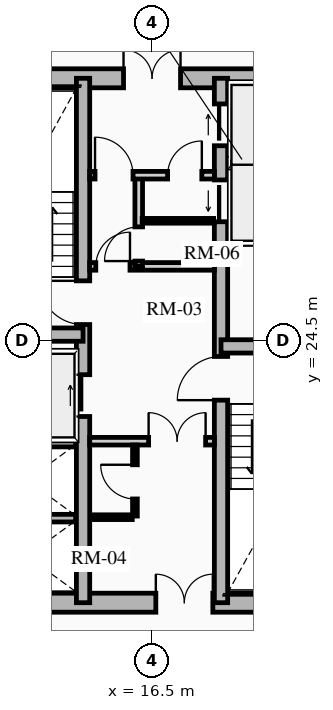
"""IFC4 building model, lengths in metres.
Left out: names, types, materials, properties, quantities, classifications, styles, units other than length and angle.
Written with IfcOpenShell. Run it as: python <this file> out.ifc"""

import sys

from ifc_helpers import new_model, si_unit, direction, frame, frame_2d, origin, place, context, subcontext, project, spatial, rectangle, extrude, source, transform, mapped, element, fill, save


model = new_model("IFC4")
c1 = context("Model", 3, precision=1e-05, world=origin(), true_north=direction((0.0, 1.0)))
c2 = subcontext(c1, "Body", "Model", "MODEL_VIEW")
j1 = project(units=[si_unit("LENGTHUNIT", "METRE"), si_unit("PLANEANGLEUNIT", "RADIAN")], contexts=[c1])
p1 = place(None, origin())
s1 = spatial("IfcSite", under=j1, at=p1, CompositionType="ELEMENT")
p2 = place(p1, origin())
s2 = spatial("IfcBuilding", under=s1, at=p2, CompositionType="ELEMENT")
p3 = place(p2, frame((0.0, 0.0, 51.1)))
s3 = spatial("IfcBuildingStorey", under=s2, at=p3, CompositionType="ELEMENT", Elevation=51.1)
p4 = place(p3, frame((11.15, 17.6, 0.0), z_axis=(0.0, 0.0, 1.0), x_axis=(1.0, 0.0, 0.0)))
e1 = element("IfcWall", 1, at=p4, inside=s3, PredefinedType="SHEAR", context=c2, shape_type="SweptSolid", body=[
    extrude(rectangle(XDim=10.7, YDim=0.5, at=frame_2d((5.35, 0.0))), origin(), (0.0, 0.0, 1.0), 2.91),
])
m1 = source(origin(), c2, "Body", "SweptSolid", [
    extrude(rectangle(XDim=1.5, YDim=2.02, at=frame_2d((0.75, 1.01))), frame((0.0, 0.26, 0.0), z_axis=(0.0, -1.0, 0.0), x_axis=(1.0, 0.0, 0.0)), (0.0, 0.0, 1.0), 0.52),
])
p5 = place(p4, frame((5.45, 0.0, 0.0)))
e2 = element("IfcOpeningElement", 2, at=p5, cuts=e1, PredefinedType="OPENING", context=c2, shape_type="MappedRepresentation", body=[
    mapped(m1, transform((0.0, 0.0, 0.0), x_axis=(1.0, 0.0, 0.0), y_axis=(0.0, 1.0, 0.0), z_axis=(0.0, 0.0, 1.0), scale=1.0)),
])
p6 = place(p3, frame((11.15, 31.4, 0.0), z_axis=(0.0, 0.0, 1.0), x_axis=(1.0, 0.0, 0.0)))
e3 = element("IfcWall", 3, at=p6, inside=s3, PredefinedType="SHEAR", context=c2, shape_type="SweptSolid", body=[
    extrude(rectangle(XDim=10.7, YDim=0.5, at=frame_2d((5.35, 0.0))), origin(), (0.0, 0.0, 1.0), 2.91),
])
p7 = place(p6, frame((4.6, 0.0, 0.0)))
e4 = element("IfcOpeningElement", 4, at=p7, cuts=e3, PredefinedType="OPENING", context=c2, shape_type="MappedRepresentation", body=[
    mapped(m1, transform((0.0, 0.0, 0.0), x_axis=(1.0, 0.0, 0.0), y_axis=(0.0, 1.0, 0.0), z_axis=(0.0, 0.0, 1.0), scale=1.0)),
])
p8 = place(p3, frame((14.685, 17.6, 0.0), z_axis=(0.0, 0.0, 1.0), x_axis=(0.0, 1.0, 0.0)))
e5 = element("IfcWall", 5, at=p8, inside=s3, PredefinedType="SHEAR", context=c2, shape_type="SweptSolid", body=[
    extrude(rectangle(XDim=13.8, YDim=0.35, at=frame_2d((6.9, 0.0))), origin(), (0.0, 0.0, 1.0), 2.91),
])
m2 = source(origin(), c2, "Body", "SweptSolid", [
    extrude(rectangle(XDim=1.1, YDim=2.015, at=frame_2d((0.55, 1.007))), frame((0.0, 0.185, 0.0), z_axis=(0.0, -1.0, 0.0), x_axis=(1.0, 0.0, 0.0)), (0.0, 0.0, 1.0), 0.37),
])
p9 = place(p8, frame((4.9, 0.0, 0.0)))
e6 = element("IfcOpeningElement", 6, at=p9, cuts=e5, PredefinedType="OPENING", context=c2, shape_type="MappedRepresentation", body=[
    mapped(m2, transform((0.0, 0.0, 0.0), x_axis=(1.0, 0.0, 0.0), y_axis=(0.0, 1.0, 0.0), z_axis=(0.0, 0.0, 1.0), scale=1.0)),
])
m3 = source(origin(), c2, "Body", "SweptSolid", [
    extrude(rectangle(XDim=1.15, YDim=2.02, at=frame_2d((0.575, 1.01))), frame((0.0, 0.185, 0.0), z_axis=(0.0, -1.0, 0.0), x_axis=(1.0, 0.0, 0.0)), (0.0, 0.0, 1.0), 0.37),
])
p10 = place(p8, frame((7.32, 0.0, 0.0)))
e7 = element("IfcOpeningElement", 7, at=p10, cuts=e5, PredefinedType="OPENING", context=c2, shape_type="MappedRepresentation", body=[
    mapped(m3, transform((0.0, 0.0, 0.0), x_axis=(1.0, 0.0, 0.0), y_axis=(0.0, 1.0, 0.0), z_axis=(0.0, 0.0, 1.0), scale=1.0)),
])
p11 = place(p3, frame((18.315, 17.6, 0.0), z_axis=(0.0, 0.0, 1.0), x_axis=(0.0, 1.0, 0.0)))
e8 = element("IfcWall", 8, at=p11, inside=s3, PredefinedType="SHEAR", context=c2, shape_type="SweptSolid", body=[
    extrude(rectangle(XDim=13.8, YDim=0.35, at=frame_2d((6.9, 0.0))), origin(), (0.0, 0.0, 1.0), 2.91),
])
p12 = place(p11, frame((10.025, 0.0, 0.0)))
e9 = element("IfcOpeningElement", 9, at=p12, cuts=e8, PredefinedType="OPENING", context=c2, shape_type="MappedRepresentation", body=[
    mapped(m2, transform((0.0, 0.0, 0.0), x_axis=(1.0, 0.0, 0.0), y_axis=(0.0, 1.0, 0.0), z_axis=(0.0, 0.0, 1.0), scale=1.0)),
])
p13 = place(p11, frame((12.025, 0.0, 0.0)))
e10 = element("IfcOpeningElement", 10, at=p13, cuts=e8, PredefinedType="OPENING", context=c2, shape_type="MappedRepresentation", body=[
    mapped(m2, transform((0.0, 0.0, 0.0), x_axis=(1.0, 0.0, 0.0), y_axis=(0.0, 1.0, 0.0), z_axis=(0.0, 0.0, 1.0), scale=1.0)),
])
p14 = place(p11, frame((5.33, 0.0, 0.0)))
e11 = element("IfcOpeningElement", 11, at=p14, cuts=e8, PredefinedType="OPENING", context=c2, shape_type="MappedRepresentation", body=[
    mapped(m3, transform((0.0, 0.0, 0.0), x_axis=(1.0, 0.0, 0.0), y_axis=(0.0, 1.0, 0.0), z_axis=(0.0, 0.0, 1.0), scale=1.0)),
])
for number, where, z_axis, x_axis in (
    (12, (11.4, 24.655, 0.0), (0.0, 0.0, 1.0), (1.0, 0.0, 0.0)),
    (13, (18.315, 24.345, 0.0), (0.0, 0.0, 1.0), (1.0, 0.0, 0.0)),
):
    element("IfcWall", number, at=place(p3, frame(where, z_axis=z_axis, x_axis=x_axis)), inside=s3, PredefinedType="SHEAR", context=c2, shape_type="SweptSolid", body=[
        extrude(rectangle(XDim=3.285, YDim=0.35, at=frame_2d((1.643, 0.0))), origin(), (0.0, 0.0, 1.0), 2.91),
    ])
for number, where, z_axis, x_axis in (
    (14, (11.52, 21.8, 0.0), (0.0, 0.0, 1.0), (1.0, 0.0, 0.0)),
    (15, (11.52, 19.825, 0.0), (0.0, 0.0, 1.0), (1.0, 0.0, 0.0)),
    (16, (18.51, 27.13, 0.0), (0.0, 0.0, 1.0), (1.0, 0.0, 0.0)),
    (17, (18.51, 29.175, 0.0), (0.0, 0.0, 1.0), (1.0, 0.0, 0.0)),
):
    element("IfcWall", number, at=place(p3, frame(where, z_axis=z_axis, x_axis=x_axis)), inside=s3, PredefinedType="SHEAR", context=c2, shape_type="SweptSolid", body=[
        extrude(rectangle(XDim=2.97, YDim=0.2, at=frame_2d((1.485, 0.0))), origin(), (0.0, 0.0, 1.0), 2.91),
    ])
p15 = place(p3, frame((14.86, 21.85, 0.0), z_axis=(0.0, 0.0, 1.0), x_axis=(1.0, 0.0, 0.0)))
e18 = element("IfcWall", 18, at=p15, inside=s3, PredefinedType="PARTITIONING", context=c2, shape_type="SweptSolid", body=[
    extrude(rectangle(XDim=3.28, YDim=0.2, at=frame_2d((1.64, 0.0))), origin(), (0.0, 0.0, 1.0), 2.635),
])
m4 = source(origin(), c2, "Body", "SweptSolid", [
    extrude(rectangle(XDim=1.5, YDim=2.02, at=frame_2d((0.75, 1.01))), frame((0.0, 0.11, 0.0), z_axis=(0.0, -1.0, 0.0), x_axis=(1.0, 0.0, 0.0)), (0.0, 0.0, 1.0), 0.22),
])
p16 = place(p15, frame((1.55, 0.0, 0.0)))
e19 = element("IfcOpeningElement", 19, at=p16, cuts=e18, PredefinedType="OPENING", context=c2, shape_type="MappedRepresentation", body=[
    mapped(m4, transform((0.0, 0.0, 0.0), x_axis=(1.0, 0.0, 0.0), y_axis=(0.0, 1.0, 0.0), z_axis=(0.0, 0.0, 1.0), scale=1.0)),
])
p17 = place(p3, frame((14.86, 26.45, 0.0), z_axis=(0.0, 0.0, 1.0), x_axis=(1.0, 0.0, 0.0)))
e20 = element("IfcWall", 20, at=p17, inside=s3, PredefinedType="PARTITIONING", context=c2, shape_type="SweptSolid", body=[
    extrude(rectangle(XDim=3.28, YDim=0.2, at=frame_2d((1.64, 0.0))), origin(), (0.0, 0.0, 1.0), 2.635),
])
m5 = source(origin(), c2, "Body", "SweptSolid", [
    extrude(rectangle(XDim=0.9, YDim=2.005, at=frame_2d((0.45, 1.002))), frame((0.0, 0.11, 0.0), z_axis=(0.0, -1.0, 0.0), x_axis=(1.0, 0.0, 0.0)), (0.0, 0.0, 1.0), 0.22),
])
p18 = place(p17, frame((0.16, 0.0, 0.0)))
e21 = element("IfcOpeningElement", 21, at=p18, cuts=e20, PredefinedType="OPENING", context=c2, shape_type="MappedRepresentation", body=[
    mapped(m5, transform((0.0, 0.0, 0.0), x_axis=(1.0, 0.0, 0.0), y_axis=(0.0, 1.0, 0.0), z_axis=(0.0, 0.0, 1.0), scale=1.0)),
])
p19 = place(p3, frame((16.15, 26.45, 0.0), z_axis=(0.0, 0.0, 1.0), x_axis=(0.0, 1.0, 0.0)))
e22 = element("IfcWall", 22, at=p19, inside=s3, PredefinedType="PARTITIONING", context=c2, shape_type="SweptSolid", body=[
    extrude(rectangle(XDim=2.4, YDim=0.2, at=frame_2d((1.2, 0.0))), origin(), (0.0, 0.0, 1.0), 2.635),
])
p20 = place(p19, frame((0.14, 0.0, 0.0)))
e23 = element("IfcOpeningElement", 23, at=p20, cuts=e22, PredefinedType="OPENING", context=c2, shape_type="MappedRepresentation", body=[
    mapped(m5, transform((0.0, 0.0, 0.0), x_axis=(1.0, 0.0, 0.0), y_axis=(0.0, 1.0, 0.0), z_axis=(0.0, 0.0, 1.0), scale=1.0)),
])
p21 = place(p3, frame((14.86, 28.85, 0.0), z_axis=(0.0, 0.0, 1.0), x_axis=(1.0, 0.0, 0.0)))
e24 = element("IfcWall", 24, at=p21, inside=s3, PredefinedType="PARTITIONING", context=c2, shape_type="SweptSolid", body=[
    extrude(rectangle(XDim=3.28, YDim=0.2, at=frame_2d((1.64, 0.0))), origin(), (0.0, 0.0, 1.0), 2.635),
])
m6 = source(origin(), c2, "Body", "SweptSolid", [
    extrude(rectangle(XDim=1.0, YDim=2.015, at=frame_2d((0.5, 1.007))), frame((0.0, 0.11, 0.0), z_axis=(0.0, -1.0, 0.0), x_axis=(1.0, 0.0, 0.0)), (0.0, 0.0, 1.0), 0.22),
])
p22 = place(p21, frame((0.14, 0.0, 0.0)))
e25 = element("IfcOpeningElement", 25, at=p22, cuts=e24, PredefinedType="OPENING", context=c2, shape_type="MappedRepresentation", body=[
    mapped(m6, transform((0.0, 0.0, 0.0), x_axis=(1.0, 0.0, 0.0), y_axis=(0.0, 1.0, 0.0), z_axis=(0.0, 0.0, 1.0), scale=1.0)),
])
p23 = place(p21, frame((2.05, 0.0, 0.0)))
e26 = element("IfcOpeningElement", 26, at=p23, cuts=e24, PredefinedType="OPENING", context=c2, shape_type="MappedRepresentation", body=[
    mapped(m5, transform((0.0, 0.0, 0.0), x_axis=(1.0, 0.0, 0.0), y_axis=(0.0, 1.0, 0.0), z_axis=(0.0, 0.0, 1.0), scale=1.0)),
])
p24 = place(p3, frame((16.05, 19.88, 0.0), z_axis=(0.0, 0.0, 1.0), x_axis=(0.0, 1.0, 0.0)))
e27 = element("IfcWall", 27, at=p24, inside=s3, PredefinedType="PARTITIONING", context=c2, shape_type="SweptSolid", body=[
    extrude(rectangle(XDim=1.87, YDim=0.125, at=frame_2d((0.935, 0.0))), origin(), (0.0, 0.0, 1.0), 2.635),
])
m7 = source(origin(), c2, "Body", "SweptSolid", [
    extrude(rectangle(XDim=0.9, YDim=2.005, at=frame_2d((0.45, 1.002))), frame((0.0, 0.073, 0.0), z_axis=(0.0, -1.0, 0.0), x_axis=(1.0, 0.0, 0.0)), (0.0, 0.0, 1.0), 0.145),
])
p25 = place(p24, frame((0.45, 0.0, 0.0)))
e28 = element("IfcOpeningElement", 28, at=p25, cuts=e27, PredefinedType="OPENING", context=c2, shape_type="MappedRepresentation", body=[
    mapped(m7, transform((0.0, 0.0, 0.0), x_axis=(1.0, 0.0, 0.0), y_axis=(0.0, 1.0, 0.0), z_axis=(0.0, 0.0, 1.0), scale=1.0)),
])
p26 = place(p3, frame((14.88, 19.85, 0.0), z_axis=(0.0, 0.0, 1.0), x_axis=(1.0, 0.0, 0.0)))
e29 = element("IfcWall", 29, at=p26, inside=s3, PredefinedType="PARTITIONING", context=c2, shape_type="SweptSolid", body=[
    extrude(rectangle(XDim=1.1, YDim=0.125, at=frame_2d((0.55, 0.0))), origin(), (0.0, 0.0, 1.0), 2.635),
])
p27 = place(p3, frame((16.24, 27.65, 0.0), z_axis=(0.0, 0.0, 1.0), x_axis=(1.0, 0.0, 0.0)))
e30 = element("IfcWall", 30, at=p27, inside=s3, PredefinedType="PARTITIONING", context=c2, shape_type="SweptSolid", body=[
    extrude(rectangle(XDim=1.88, YDim=0.125, at=frame_2d((0.94, 0.0))), origin(), (0.0, 0.0, 1.0), 2.635),
])
m8 = source(origin(), c2, "Body", "SweptSolid", [
    extrude(rectangle(XDim=1.1, YDim=2.015, at=frame_2d((0.55, 1.007))), frame((0.0, 0.025, 0.0), z_axis=(0.0, -1.0, 0.0), x_axis=(1.0, 0.0, 0.0)), (0.0, 0.0, 1.0), 0.05),
])
p28 = place(p9, origin())
e31 = element("IfcDoor", 31, at=p28, inside=s3, OperationType="SLIDING_TO_RIGHT", PredefinedType="DOOR", context=c2, shape_type="MappedRepresentation", body=[
    mapped(m8, transform((0.0, 0.0, 0.0), x_axis=(1.0, 0.0, 0.0), y_axis=(0.0, 1.0, 0.0), z_axis=(0.0, 0.0, 1.0), scale=1.0)),
])
fill(e6, e31)
p29 = place(p12, origin())
e32 = element("IfcDoor", 32, at=p29, inside=s3, OperationType="SLIDING_TO_LEFT", PredefinedType="DOOR", context=c2, shape_type="MappedRepresentation", body=[
    mapped(m8, transform((0.0, 0.0, 0.0), x_axis=(1.0, 0.0, 0.0), y_axis=(0.0, 1.0, 0.0), z_axis=(0.0, 0.0, 1.0), scale=1.0)),
])
fill(e9, e32)
p30 = place(p13, origin())
e33 = element("IfcDoor", 33, at=p30, inside=s3, OperationType="SLIDING_TO_RIGHT", PredefinedType="DOOR", context=c2, shape_type="MappedRepresentation", body=[
    mapped(m8, transform((0.0, 0.0, 0.0), x_axis=(1.0, 0.0, 0.0), y_axis=(0.0, 1.0, 0.0), z_axis=(0.0, 0.0, 1.0), scale=1.0)),
])
fill(e10, e33)
m9 = source(origin(), c2, "Body", "SweptSolid", [
    extrude(rectangle(XDim=1.15, YDim=2.02, at=frame_2d((0.575, 1.01))), frame((0.0, 0.025, 0.0), z_axis=(0.0, -1.0, 0.0), x_axis=(1.0, 0.0, 0.0)), (0.0, 0.0, 1.0), 0.05),
])
p31 = place(p10, origin())
e34 = element("IfcDoor", 34, at=p31, inside=s3, OperationType="SINGLE_SWING_RIGHT", PredefinedType="DOOR", context=c2, shape_type="MappedRepresentation", body=[
    mapped(m9, transform((0.0, 0.0, 0.0), x_axis=(1.0, 0.0, 0.0), y_axis=(0.0, 1.0, 0.0), z_axis=(0.0, 0.0, 1.0), scale=1.0)),
])
fill(e7, e34)
p32 = place(p14, origin())
e35 = element("IfcDoor", 35, at=p32, inside=s3, OperationType="SINGLE_SWING_LEFT", PredefinedType="DOOR", context=c2, shape_type="MappedRepresentation", body=[
    mapped(m9, transform((0.0, 0.0, 0.0), x_axis=(1.0, 0.0, 0.0), y_axis=(0.0, 1.0, 0.0), z_axis=(0.0, 0.0, 1.0), scale=1.0)),
])
fill(e11, e35)
m10 = source(origin(), c2, "Body", "SweptSolid", [
    extrude(rectangle(XDim=1.5, YDim=2.02, at=frame_2d((0.75, 1.01))), frame((0.0, 0.025, 0.0), z_axis=(0.0, -1.0, 0.0), x_axis=(1.0, 0.0, 0.0)), (0.0, 0.0, 1.0), 0.05),
])
p33 = place(p7, origin())
e36 = element("IfcDoor", 36, at=p33, inside=s3, OperationType="DOUBLE_DOOR_SINGLE_SWING", PredefinedType="DOOR", context=c2, shape_type="MappedRepresentation", body=[
    mapped(m10, transform((0.0, 0.0, 0.0), x_axis=(1.0, 0.0, 0.0), y_axis=(0.0, 1.0, 0.0), z_axis=(0.0, 0.0, 1.0), scale=1.0)),
])
fill(e4, e36)
p34 = place(p5, origin())
e37 = element("IfcDoor", 37, at=p34, inside=s3, OperationType="DOUBLE_DOOR_SINGLE_SWING", PredefinedType="DOOR", context=c2, shape_type="MappedRepresentation", body=[
    mapped(m10, transform((0.0, 0.0, 0.0), x_axis=(1.0, 0.0, 0.0), y_axis=(0.0, 1.0, 0.0), z_axis=(0.0, 0.0, 1.0), scale=1.0)),
])
fill(e2, e37)
p35 = place(p16, origin())
e38 = element("IfcDoor", 38, at=p35, inside=s3, OperationType="DOUBLE_DOOR_SINGLE_SWING", PredefinedType="DOOR", context=c2, shape_type="MappedRepresentation", body=[
    mapped(m10, transform((0.0, 0.0, 0.0), x_axis=(1.0, 0.0, 0.0), y_axis=(0.0, 1.0, 0.0), z_axis=(0.0, 0.0, 1.0), scale=1.0)),
])
fill(e19, e38)
m11 = source(origin(), c2, "Body", "SweptSolid", [
    extrude(rectangle(XDim=0.9, YDim=2.005, at=frame_2d((0.45, 1.002))), frame((0.0, 0.025, 0.0), z_axis=(0.0, -1.0, 0.0), x_axis=(1.0, 0.0, 0.0)), (0.0, 0.0, 1.0), 0.05),
])
p36 = place(p18, origin())
e39 = element("IfcDoor", 39, at=p36, inside=s3, OperationType="SINGLE_SWING_RIGHT", PredefinedType="DOOR", context=c2, shape_type="MappedRepresentation", body=[
    mapped(m11, transform((0.0, 0.0, 0.0), x_axis=(1.0, 0.0, 0.0), y_axis=(0.0, 1.0, 0.0), z_axis=(0.0, 0.0, 1.0), scale=1.0)),
])
fill(e21, e39)
m12 = source(origin(), c2, "Body", "SweptSolid", [
    extrude(rectangle(XDim=1.0, YDim=2.015, at=frame_2d((0.5, 1.007))), frame((0.0, 0.025, 0.0), z_axis=(0.0, -1.0, 0.0), x_axis=(1.0, 0.0, 0.0)), (0.0, 0.0, 1.0), 0.05),
])
p37 = place(p22, origin())
e40 = element("IfcDoor", 40, at=p37, inside=s3, OperationType="SINGLE_SWING_LEFT", PredefinedType="DOOR", context=c2, shape_type="MappedRepresentation", body=[
    mapped(m12, transform((0.0, 0.0, 0.0), x_axis=(1.0, 0.0, 0.0), y_axis=(0.0, 1.0, 0.0), z_axis=(0.0, 0.0, 1.0), scale=1.0)),
])
fill(e25, e40)
p38 = place(p25, origin())
e41 = element("IfcDoor", 41, at=p38, inside=s3, OperationType="SINGLE_SWING_RIGHT", PredefinedType="DOOR", context=c2, shape_type="MappedRepresentation", body=[
    mapped(m11, transform((0.0, 0.0, 0.0), x_axis=(1.0, 0.0, 0.0), y_axis=(0.0, 1.0, 0.0), z_axis=(0.0, 0.0, 1.0), scale=1.0)),
])
fill(e28, e41)
p39 = place(p20, origin())
e42 = element("IfcDoor", 42, at=p39, inside=s3, OperationType="SINGLE_SWING_LEFT", PredefinedType="DOOR", context=c2, shape_type="MappedRepresentation", body=[
    mapped(m11, transform((0.0, 0.0, 0.0), x_axis=(1.0, 0.0, 0.0), y_axis=(0.0, 1.0, 0.0), z_axis=(0.0, 0.0, 1.0), scale=1.0)),
])
fill(e23, e42)
p40 = place(p23, origin())
e43 = element("IfcDoor", 43, at=p40, inside=s3, OperationType="SINGLE_SWING_RIGHT", PredefinedType="DOOR", context=c2, shape_type="MappedRepresentation", body=[
    mapped(m11, transform((0.0, 0.0, 0.0), x_axis=(1.0, 0.0, 0.0), y_axis=(0.0, 1.0, 0.0), z_axis=(0.0, 0.0, 1.0), scale=1.0)),
])
fill(e26, e43)
save(model, sys.argv[1])
